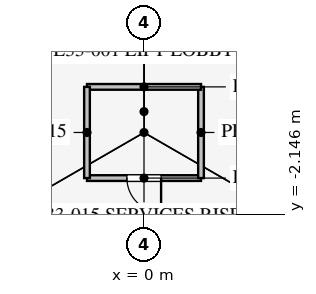
"""IFC4 building model, lengths in metres.
Left out: names, types, materials, properties, quantities, classifications, styles, units other than length and angle.
Written with IfcOpenShell. Run it as: python <this file> out.ifc"""

import sys

from ifc_helpers import new_model, si_unit, direction, frame, frame_2d, origin, place, context, subcontext, project, spatial, rectangle, extrude, element, fill, save


model = new_model("IFC4")
c1 = context("Model", 3, precision=1e-05, world=origin(), true_north=direction((0.0, 1.0)))
c2 = subcontext(c1, "Body", "Model", "MODEL_VIEW")
j1 = project(units=[si_unit("LENGTHUNIT", "METRE"), si_unit("PLANEANGLEUNIT", "RADIAN")], contexts=[c1])
p1 = place(None, origin())
s1 = spatial("IfcSite", under=j1, at=p1, CompositionType="ELEMENT")
p2 = place(p1, origin())
s2 = spatial("IfcBuilding", under=s1, at=p2, CompositionType="ELEMENT")
p3 = place(p2, frame((0.0, 0.0, 145.1)))
s3 = spatial("IfcBuildingStorey", under=s2, at=p3, CompositionType="ELEMENT", Elevation=145.1)
p4 = place(p3, frame((-1.5, -1.2, 0.0), z_axis=(0.0, 0.0, 1.0), x_axis=(1.0, 0.0, 0.0)))
e1 = element("IfcWall", 1, at=p4, inside=s3, PredefinedType="PARTITIONING", context=c2, shape_type="SweptSolid", body=[
    extrude(rectangle(XDim=3.0, YDim=0.15, at=frame_2d((1.5, 0.0))), origin(), (0.0, 0.0, 1.0), 4.0),
])
p5 = place(p4, frame((1.05, 0.0, 0.0)))
e2 = element("IfcOpeningElement", 2, at=p5, cuts=e1, PredefinedType="OPENING", context=c2, shape_type="SweptSolid", body=[
    extrude(rectangle(XDim=0.9, YDim=2.1, at=frame_2d((0.45, 1.05))), frame((0.0, 0.085, 0.0), z_axis=(0.0, -1.0, 0.0), x_axis=(1.0, 0.0, 0.0)), (0.0, 0.0, 1.0), 0.17),
])
p6 = place(p3, frame((1.5, -1.2, 0.0), z_axis=(0.0, 0.0, 1.0), x_axis=(0.0, 1.0, 0.0)))
e3 = element("IfcWall", 3, at=p6, inside=s3, PredefinedType="PARTITIONING", context=c2, shape_type="SweptSolid", body=[
    extrude(rectangle(XDim=2.4, YDim=0.15, at=frame_2d((1.2, 0.0))), origin(), (0.0, 0.0, 1.0), 4.0),
])
p7 = place(p3, frame((1.5, 1.2, 0.0), z_axis=(0.0, 0.0, 1.0), x_axis=(-1.0, 0.0, 0.0)))
e4 = element("IfcWall", 4, at=p7, inside=s3, PredefinedType="PARTITIONING", context=c2, shape_type="SweptSolid", body=[
    extrude(rectangle(XDim=3.0, YDim=0.15, at=frame_2d((1.5, 0.0))), origin(), (0.0, 0.0, 1.0), 4.0),
])
p8 = place(p3, frame((-1.5, 1.2, 0.0), z_axis=(0.0, 0.0, 1.0), x_axis=(0.0, -1.0, 0.0)))
e5 = element("IfcWall", 5, at=p8, inside=s3, PredefinedType="PARTITIONING", context=c2, shape_type="SweptSolid", body=[
    extrude(rectangle(XDim=2.4, YDim=0.15, at=frame_2d((1.2, 0.0))), origin(), (0.0, 0.0, 1.0), 4.0),
])
p9 = place(p3, frame((26.415, -15.231, 0.0), z_axis=(0.0, 0.0, 1.0), x_axis=(-0.50000091641, 0.866024874695, 0.0)))
e6 = element("IfcWall", 6, at=p9, inside=s3, PredefinedType="PARTITIONING", context=c2, shape_type="SweptSolid", body=[
    extrude(rectangle(XDim=52.796, YDim=0.12, at=frame_2d((26.398, 0.0))), origin(), (0.0, 0.0, 1.0), 2.9),
])
p10 = place(p9, frame((10.2, 0.0, 0.15)))
e7 = element("IfcOpeningElement", 7, at=p10, cuts=e6, PredefinedType="OPENING", context=c2, shape_type="SweptSolid", body=[
    extrude(rectangle(XDim=1.8, YDim=2.1, at=frame_2d((0.9, 1.05))), frame((0.0, 0.07, 0.0), z_axis=(0.0, -1.0, 0.0), x_axis=(1.0, 0.0, 0.0)), (0.0, 0.0, 1.0), 0.14),
])
p11 = place(p9, frame((40.8, 0.0, 0.15)))
e8 = element("IfcOpeningElement", 8, at=p11, cuts=e6, PredefinedType="OPENING", context=c2, shape_type="SweptSolid", body=[
    extrude(rectangle(XDim=1.8, YDim=2.1, at=frame_2d((0.9, 1.05))), frame((0.0, 0.07, 0.0), z_axis=(0.0, -1.0, 0.0), x_axis=(1.0, 0.0, 0.0)), (0.0, 0.0, 1.0), 0.14),
])
p12 = place(p3, frame((-0.016, 30.491, 0.0), z_axis=(0.0, 0.0, 1.0), x_axis=(-0.50000091641, -0.866024874695, 0.0)))
e9 = element("IfcWall", 9, at=p12, inside=s3, PredefinedType="PARTITIONING", context=c2, shape_type="SweptSolid", body=[
    extrude(rectangle(XDim=52.796, YDim=0.12, at=frame_2d((26.398, 0.0))), origin(), (0.0, 0.0, 1.0), 2.9),
])
p13 = place(p12, frame((10.2, 0.0, 0.15)))
e10 = element("IfcOpeningElement", 10, at=p13, cuts=e9, PredefinedType="OPENING", context=c2, shape_type="SweptSolid", body=[
    extrude(rectangle(XDim=1.8, YDim=2.1, at=frame_2d((0.9, 1.05))), frame((0.0, 0.07, 0.0), z_axis=(0.0, -1.0, 0.0), x_axis=(1.0, 0.0, 0.0)), (0.0, 0.0, 1.0), 0.14),
])
p14 = place(p12, frame((40.8, 0.0, 0.15)))
e11 = element("IfcOpeningElement", 11, at=p14, cuts=e9, PredefinedType="OPENING", context=c2, shape_type="SweptSolid", body=[
    extrude(rectangle(XDim=1.8, YDim=2.1, at=frame_2d((0.9, 1.05))), frame((0.0, 0.07, 0.0), z_axis=(0.0, -1.0, 0.0), x_axis=(1.0, 0.0, 0.0)), (0.0, 0.0, 1.0), 0.14),
])
p15 = place(p5, frame((0.9, 0.0, 0.0), z_axis=(0.0, 0.0, 1.0), x_axis=(-1.0, 0.0, 0.0)))
e12 = element("IfcDoor", 12, at=p15, inside=s3, OperationType="SINGLE_SWING_LEFT", PredefinedType="DOOR", context=c2, shape_type="SweptSolid", body=[
    extrude(rectangle(XDim=0.9, YDim=2.1, at=frame_2d((0.45, 1.05))), frame((0.0, 0.025, 0.0), z_axis=(0.0, -1.0, 0.0), x_axis=(1.0, 0.0, 0.0)), (0.0, 0.0, 1.0), 0.05),
])
fill(e2, e12)
save(model, sys.argv[1])
